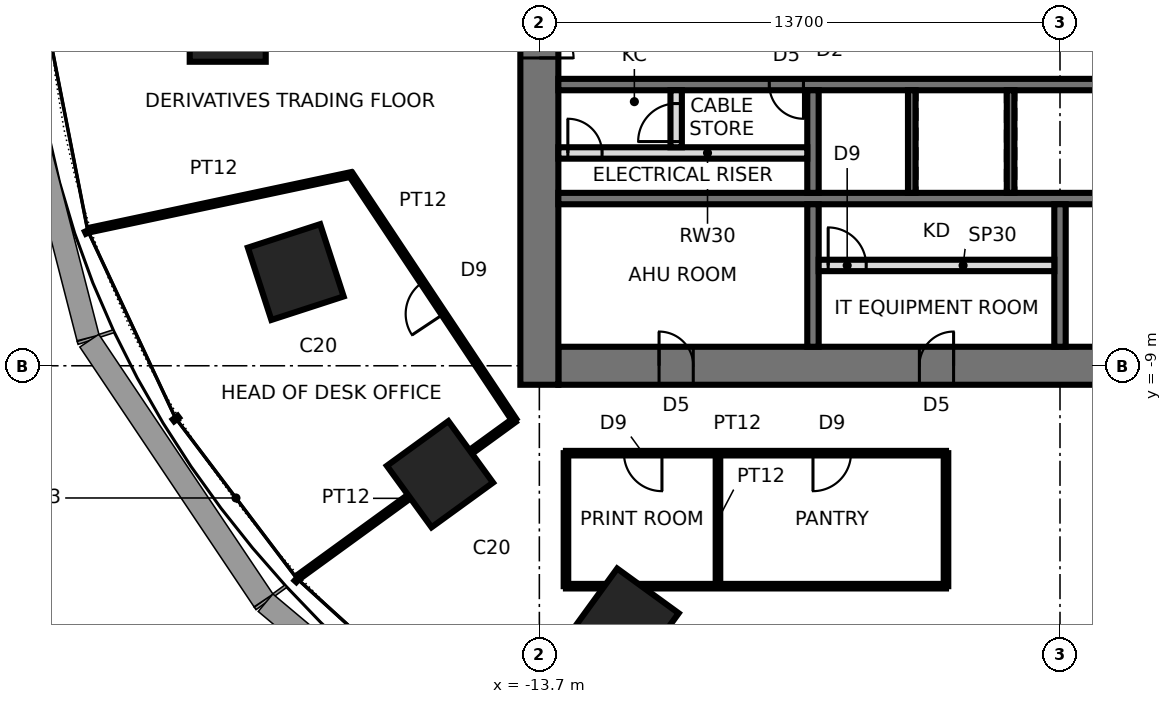
"""IFC4 building model, lengths in metres.
Left out: names, types, materials, properties, quantities, classifications, styles, units other than length and angle.
Written with IfcOpenShell. Run it as: python <this file> out.ifc"""

import sys

from ifc_helpers import new_model, si_unit, direction, frame, frame_2d, origin, origin_2d, place, context, subcontext, project, spatial, rectangle, extrude, element, fill, save


model = new_model("IFC4")
c1 = context("Model", 3, precision=1e-05, world=origin(), true_north=direction((0.0, 1.0)))
c2 = subcontext(c1, "Body", "Model", "MODEL_VIEW")
j1 = project(units=[si_unit("LENGTHUNIT", "METRE"), si_unit("PLANEANGLEUNIT", "RADIAN")], contexts=[c1])
p1 = place(None, origin())
s1 = spatial("IfcSite", under=j1, at=p1, CompositionType="ELEMENT")
p2 = place(p1, origin())
s2 = spatial("IfcBuilding", under=s1, at=p2, CompositionType="ELEMENT")
p3 = place(p2, frame((0.0, 0.0, 23.8)))
s3 = spatial("IfcBuildingStorey", under=s2, at=p3, CompositionType="ELEMENT", Elevation=23.8)
for number, where, z_axis, x_axis in (
    (1, (-21.9, 0.0, 0.0), (0.0, 0.0, 1.0), (-1.0, 0.0, 0.0)),
    (2, (-20.109, -6.534, 0.0), (0.0, 0.0, 1.0), (-0.951, -0.309, 0.0)),
    (3, (-16.315, -11.854, 0.0), (0.0, 0.0, 1.0), (-0.809, -0.588, 0.0)),
    (4, (-11.43, -15.733, 0.0), (0.0, 0.0, 1.0), (-0.588, -0.809, 0.0)),
):
    element("IfcColumn", number, at=place(p3, frame(where, z_axis=z_axis, x_axis=x_axis)), inside=s3, PredefinedType="COLUMN", context=c2, shape_type="SweptSolid", body=[
        extrude(rectangle(XDim=2.0, YDim=2.0, at=origin_2d()), origin(), (0.0, 0.0, 1.0), 4.2),
    ])
p4 = place(p3, frame((-13.2, -9.0, 0.0), z_axis=(0.0, 0.0, 1.0), x_axis=(1.0, 0.0, 0.0)))
e5 = element("IfcWall", 5, at=p4, inside=s3, PredefinedType="SHEAR", context=c2, shape_type="SweptSolid", body=[
    extrude(rectangle(XDim=26.4, YDim=1.0, at=frame_2d((13.2, 0.0))), origin(), (0.0, 0.0, 1.0), 4.2),
])
p5 = place(p4, frame((2.65, 0.0, 0.0)))
e6 = element("IfcOpeningElement", 6, at=p5, cuts=e5, PredefinedType="OPENING", context=c2, shape_type="SweptSolid", body=[
    extrude(rectangle(XDim=0.9, YDim=2.1, at=frame_2d((0.45, 1.05))), frame((0.0, 0.51, 0.0), z_axis=(0.0, -1.0, 0.0), x_axis=(1.0, 0.0, 0.0)), (0.0, 0.0, 1.0), 1.02),
])
p6 = place(p4, frame((9.5, 0.0, 0.0)))
e7 = element("IfcOpeningElement", 7, at=p6, cuts=e5, PredefinedType="OPENING", context=c2, shape_type="SweptSolid", body=[
    extrude(rectangle(XDim=0.9, YDim=2.1, at=frame_2d((0.45, 1.05))), frame((0.0, 0.51, 0.0), z_axis=(0.0, -1.0, 0.0), x_axis=(1.0, 0.0, 0.0)), (0.0, 0.0, 1.0), 1.02),
])
p7 = place(p4, frame((16.0, 0.0, 0.0)))
e8 = element("IfcOpeningElement", 8, at=p7, cuts=e5, PredefinedType="OPENING", context=c2, shape_type="SweptSolid", body=[
    extrude(rectangle(XDim=0.9, YDim=2.1, at=frame_2d((0.45, 1.05))), frame((0.0, 0.51, 0.0), z_axis=(0.0, -1.0, 0.0), x_axis=(1.0, 0.0, 0.0)), (0.0, 0.0, 1.0), 1.02),
])
p8 = place(p4, frame((22.85, 0.0, 0.0)))
e9 = element("IfcOpeningElement", 9, at=p8, cuts=e5, PredefinedType="OPENING", context=c2, shape_type="SweptSolid", body=[
    extrude(rectangle(XDim=0.9, YDim=2.1, at=frame_2d((0.45, 1.05))), frame((0.0, 0.51, 0.0), z_axis=(0.0, -1.0, 0.0), x_axis=(1.0, 0.0, 0.0)), (0.0, 0.0, 1.0), 1.02),
])
p9 = place(p3, frame((-13.7, 9.5, 0.0), z_axis=(0.0, 0.0, 1.0), x_axis=(0.0, -1.0, 0.0)))
e10 = element("IfcWall", 10, at=p9, inside=s3, PredefinedType="SHEAR", context=c2, shape_type="SweptSolid", body=[
    extrude(rectangle(XDim=19.0, YDim=1.0, at=frame_2d((9.5, 0.0))), origin(), (0.0, 0.0, 1.0), 4.2),
])
p10 = place(p9, frame((8.6, 0.0, 0.0)))
e11 = element("IfcOpeningElement", 11, at=p10, cuts=e10, PredefinedType="OPENING", context=c2, shape_type="SweptSolid", body=[
    extrude(rectangle(XDim=1.8, YDim=2.4, at=frame_2d((0.9, 1.2))), frame((0.0, 0.51, 0.0), z_axis=(0.0, -1.0, 0.0), x_axis=(1.0, 0.0, 0.0)), (0.0, 0.0, 1.0), 1.02),
])
p11 = place(p3, frame((-13.2, -1.6, 0.0), z_axis=(0.0, 0.0, 1.0), x_axis=(1.0, 0.0, 0.0)))
e12 = element("IfcWall", 12, at=p11, inside=s3, PredefinedType="SHEAR", context=c2, shape_type="SweptSolid", body=[
    extrude(rectangle(XDim=26.4, YDim=0.3, at=frame_2d((13.2, 0.0))), origin(), (0.0, 0.0, 1.0), 4.2),
])
p12 = place(p11, frame((25.15, 0.0, 0.0)))
e13 = element("IfcOpeningElement", 13, at=p12, cuts=e12, PredefinedType="OPENING", context=c2, shape_type="SweptSolid", body=[
    extrude(rectangle(XDim=1.0, YDim=2.1, at=frame_2d((0.5, 1.05))), frame((0.0, 0.16, 0.0), z_axis=(0.0, -1.0, 0.0), x_axis=(1.0, 0.0, 0.0)), (0.0, 0.0, 1.0), 0.32),
])
p13 = place(p11, frame((15.25, 0.0, 0.0)))
e14 = element("IfcOpeningElement", 14, at=p13, cuts=e12, PredefinedType="OPENING", context=c2, shape_type="SweptSolid", body=[
    extrude(rectangle(XDim=1.1, YDim=2.3, at=frame_2d((0.55, 1.15))), frame((0.0, 0.16, 0.0), z_axis=(0.0, -1.0, 0.0), x_axis=(1.0, 0.0, 0.0)), (0.0, 0.0, 1.0), 0.32),
])
p14 = place(p11, frame((17.85, 0.0, 0.0)))
e15 = element("IfcOpeningElement", 15, at=p14, cuts=e12, PredefinedType="OPENING", context=c2, shape_type="SweptSolid", body=[
    extrude(rectangle(XDim=1.1, YDim=2.3, at=frame_2d((0.55, 1.15))), frame((0.0, 0.16, 0.0), z_axis=(0.0, -1.0, 0.0), x_axis=(1.0, 0.0, 0.0)), (0.0, 0.0, 1.0), 0.32),
])
p15 = place(p11, frame((5.55, 0.0, 0.0)))
e16 = element("IfcOpeningElement", 16, at=p15, cuts=e12, PredefinedType="OPENING", context=c2, shape_type="SweptSolid", body=[
    extrude(rectangle(XDim=0.9, YDim=2.1, at=frame_2d((0.45, 1.05))), frame((0.0, 0.16, 0.0), z_axis=(0.0, -1.0, 0.0), x_axis=(1.0, 0.0, 0.0)), (0.0, 0.0, 1.0), 0.32),
])
p16 = place(p3, frame((-13.2, -4.6, 0.0), z_axis=(0.0, 0.0, 1.0), x_axis=(1.0, 0.0, 0.0)))
e17 = element("IfcWall", 17, at=p16, inside=s3, PredefinedType="SHEAR", context=c2, shape_type="SweptSolid", body=[
    extrude(rectangle(XDim=26.4, YDim=0.3, at=frame_2d((13.2, 0.0))), origin(), (0.0, 0.0, 1.0), 4.2),
])
p17 = place(p3, frame((-6.5, -1.75, 0.0), z_axis=(0.0, 0.0, 1.0), x_axis=(0.0, -1.0, 0.0)))
e18 = element("IfcWall", 18, at=p17, inside=s3, PredefinedType="SHEAR", context=c2, shape_type="SweptSolid", body=[
    extrude(rectangle(XDim=2.7, YDim=0.3, at=frame_2d((1.35, 0.0))), origin(), (0.0, 0.0, 1.0), 4.2),
])
p18 = place(p3, frame((-6.5, -4.75, 0.0), z_axis=(0.0, 0.0, 1.0), x_axis=(0.0, -1.0, 0.0)))
e19 = element("IfcWall", 19, at=p18, inside=s3, PredefinedType="SHEAR", context=c2, shape_type="SweptSolid", body=[
    extrude(rectangle(XDim=3.75, YDim=0.3, at=frame_2d((1.875, 0.0))), origin(), (0.0, 0.0, 1.0), 4.2),
])
for number, where, z_axis, x_axis in (
    (20, (-3.9, -1.75, 0.0), (0.0, 0.0, 1.0), (0.0, -1.0, 0.0)),
    (21, (-1.3, -1.75, 0.0), (0.0, 0.0, 1.0), (0.0, -1.0, 0.0)),
):
    element("IfcWall", number, at=place(p3, frame(where, z_axis=z_axis, x_axis=x_axis)), inside=s3, PredefinedType="SHEAR", context=c2, shape_type="SweptSolid", body=[
        extrude(rectangle(XDim=2.7, YDim=0.2, at=frame_2d((1.35, 0.0))), origin(), (0.0, 0.0, 1.0), 4.2),
    ])
p19 = place(p3, frame((0.0, -4.75, 0.0), z_axis=(0.0, 0.0, 1.0), x_axis=(0.0, -1.0, 0.0)))
e22 = element("IfcWall", 22, at=p19, inside=s3, PredefinedType="SHEAR", context=c2, shape_type="SweptSolid", body=[
    extrude(rectangle(XDim=3.75, YDim=0.3, at=frame_2d((1.875, 0.0))), origin(), (0.0, 0.0, 1.0), 4.2),
])
p20 = place(p3, frame((-6.35, -6.36, 0.0), z_axis=(0.0, 0.0, 1.0), x_axis=(1.0, 0.0, 0.0)))
e23 = element("IfcWall", 23, at=p20, inside=s3, PredefinedType="PARTITIONING", context=c2, shape_type="SweptSolid", body=[
    extrude(rectangle(XDim=6.2, YDim=0.3, at=frame_2d((3.1, 0.0))), origin(), (0.0, 0.0, 1.0), 4.04),
])
p21 = place(p20, frame((0.25, 0.0, 0.0)))
e24 = element("IfcOpeningElement", 24, at=p21, cuts=e23, PredefinedType="OPENING", context=c2, shape_type="SweptSolid", body=[
    extrude(rectangle(XDim=1.0, YDim=2.4, at=frame_2d((0.5, 1.2))), frame((0.0, 0.16, 0.0), z_axis=(0.0, -1.0, 0.0), x_axis=(1.0, 0.0, 0.0)), (0.0, 0.0, 1.0), 0.32),
])
p22 = place(p3, frame((-13.2, -3.4, 0.0), z_axis=(0.0, 0.0, 1.0), x_axis=(1.0, 0.0, 0.0)))
e25 = element("IfcWall", 25, at=p22, inside=s3, PredefinedType="SOLIDWALL", context=c2, shape_type="SweptSolid", body=[
    extrude(rectangle(XDim=6.55, YDim=0.3, at=frame_2d((3.275, 0.0))), origin(), (0.0, 0.0, 1.0), 4.04),
])
p23 = place(p22, frame((0.25, 0.0, 0.0)))
e26 = element("IfcOpeningElement", 26, at=p23, cuts=e25, PredefinedType="OPENING", context=c2, shape_type="SweptSolid", body=[
    extrude(rectangle(XDim=0.9, YDim=2.1, at=frame_2d((0.45, 1.05))), frame((0.0, 0.16, 0.0), z_axis=(0.0, -1.0, 0.0), x_axis=(1.0, 0.0, 0.0)), (0.0, 0.0, 1.0), 0.32),
])
p24 = place(p3, frame((-10.1, -3.25, 0.0), z_axis=(0.0, 0.0, 1.0), x_axis=(0.0, 1.0, 0.0)))
e27 = element("IfcWall", 27, at=p24, inside=s3, PredefinedType="PARTITIONING", context=c2, shape_type="SweptSolid", body=[
    extrude(rectangle(XDim=1.5, YDim=0.3, at=frame_2d((0.75, 0.0))), origin(), (0.0, 0.0, 1.0), 4.04),
])
p25 = place(p24, frame((0.15, 0.0, 0.0)))
e28 = element("IfcOpeningElement", 28, at=p25, cuts=e27, PredefinedType="OPENING", context=c2, shape_type="SweptSolid", body=[
    extrude(rectangle(XDim=1.0, YDim=2.4, at=frame_2d((0.5, 1.2))), frame((0.0, 0.16, 0.0), z_axis=(0.0, -1.0, 0.0), x_axis=(1.0, 0.0, 0.0)), (0.0, 0.0, 1.0), 0.32),
])
p26 = place(p3, frame((-18.659, -3.966, 0.0), z_axis=(0.0, 0.0, 1.0), x_axis=(-0.978148655968, -0.207906726269, 0.0)))
e29 = element("IfcWall", 29, at=p26, inside=s3, PredefinedType="PARTITIONING", context=c2, shape_type="SweptSolid", body=[
    extrude(rectangle(XDim=7.0, YDim=0.12, at=frame_2d((3.5, 0.0))), origin(), (0.0, 0.0, 1.0), 4.04),
])
p27 = place(p3, frame((-14.358, -10.431, 0.0), z_axis=(0.0, 0.0, 1.0), x_axis=(-0.553959944771, 0.832543319948, 0.0)))
e30 = element("IfcWall", 30, at=p27, inside=s3, PredefinedType="PARTITIONING", context=c2, shape_type="SweptSolid", body=[
    extrude(rectangle(XDim=7.765, YDim=0.12, at=frame_2d((3.883, 0.0))), origin(), (0.0, 0.0, 1.0), 4.04),
])
p28 = place(p27, frame((3.358, 0.0, 0.0)))
e31 = element("IfcOpeningElement", 31, at=p28, cuts=e30, PredefinedType="OPENING", context=c2, shape_type="SweptSolid", body=[
    extrude(rectangle(XDim=1.0, YDim=2.4, at=frame_2d((0.5, 1.2))), frame((0.0, 0.07, 0.0), z_axis=(0.0, -1.0, 0.0), x_axis=(1.0, 0.0, 0.0)), (0.0, 0.0, 1.0), 0.14),
])
p29 = place(p3, frame((-20.021, -14.546, 0.0), z_axis=(0.0, 0.0, 1.0), x_axis=(0.809015012105, 0.587787980643, 0.0)))
e32 = element("IfcWall", 32, at=p29, inside=s3, PredefinedType="PARTITIONING", context=c2, shape_type="SweptSolid", body=[
    extrude(rectangle(XDim=7.0, YDim=0.12, at=frame_2d((3.5, 0.0))), origin(), (0.0, 0.0, 1.0), 2.84),
])
p30 = place(p3, frame((-13.0, -14.8, 0.0), z_axis=(0.0, 0.0, 1.0), x_axis=(0.0, 1.0, 0.0)))
e33 = element("IfcWall", 33, at=p30, inside=s3, PredefinedType="PARTITIONING", context=c2, shape_type="SweptSolid", body=[
    extrude(rectangle(XDim=3.5, YDim=0.12, at=frame_2d((1.75, 0.0))), origin(), (0.0, 0.0, 1.0), 4.04),
])
p31 = place(p3, frame((-13.0, -11.3, 0.0), z_axis=(0.0, 0.0, 1.0), x_axis=(1.0, 0.0, 0.0)))
e34 = element("IfcWall", 34, at=p31, inside=s3, PredefinedType="PARTITIONING", context=c2, shape_type="SweptSolid", body=[
    extrude(rectangle(XDim=10.0, YDim=0.12, at=frame_2d((5.0, 0.0))), origin(), (0.0, 0.0, 1.0), 4.04),
])
p32 = place(p31, frame((1.526, 0.0, 0.0)))
e35 = element("IfcOpeningElement", 35, at=p32, cuts=e34, PredefinedType="OPENING", context=c2, shape_type="SweptSolid", body=[
    extrude(rectangle(XDim=1.0, YDim=2.4, at=frame_2d((0.5, 1.2))), frame((0.0, 0.07, 0.0), z_axis=(0.0, -1.0, 0.0), x_axis=(1.0, 0.0, 0.0)), (0.0, 0.0, 1.0), 0.14),
])
p33 = place(p31, frame((6.5, 0.0, 0.0)))
e36 = element("IfcOpeningElement", 36, at=p33, cuts=e34, PredefinedType="OPENING", context=c2, shape_type="SweptSolid", body=[
    extrude(rectangle(XDim=1.0, YDim=2.4, at=frame_2d((0.5, 1.2))), frame((0.0, 0.07, 0.0), z_axis=(0.0, -1.0, 0.0), x_axis=(1.0, 0.0, 0.0)), (0.0, 0.0, 1.0), 0.14),
])
p34 = place(p3, frame((-9.0, -11.3, 0.0), z_axis=(0.0, 0.0, 1.0), x_axis=(0.0, -1.0, 0.0)))
e37 = element("IfcWall", 37, at=p34, inside=s3, PredefinedType="PARTITIONING", context=c2, shape_type="SweptSolid", body=[
    extrude(rectangle(XDim=3.5, YDim=0.12, at=frame_2d((1.75, 0.0))), origin(), (0.0, 0.0, 1.0), 4.04),
])
p35 = place(p3, frame((-3.0, -14.8, 0.0), z_axis=(0.0, 0.0, 1.0), x_axis=(-1.0, 0.0, 0.0)))
e38 = element("IfcWall", 38, at=p35, inside=s3, PredefinedType="PARTITIONING", context=c2, shape_type="SweptSolid", body=[
    extrude(rectangle(XDim=10.0, YDim=0.12, at=frame_2d((5.0, 0.0))), origin(), (0.0, 0.0, 1.0), 4.04),
])
p36 = place(p3, frame((-3.0, -11.3, 0.0), z_axis=(0.0, 0.0, 1.0), x_axis=(0.0, -1.0, 0.0)))
e39 = element("IfcWall", 39, at=p36, inside=s3, PredefinedType="PARTITIONING", context=c2, shape_type="SweptSolid", body=[
    extrude(rectangle(XDim=3.5, YDim=0.12, at=frame_2d((1.75, 0.0))), origin(), (0.0, 0.0, 1.0), 4.04),
])
p37 = place(p10, origin())
e40 = element("IfcDoor", 40, at=p37, inside=s3, OperationType="DOUBLE_DOOR_SINGLE_SWING", PredefinedType="DOOR", context=c2, shape_type="SweptSolid", body=[
    extrude(rectangle(XDim=1.72, YDim=2.36, at=frame_2d((0.9, 1.18))), frame((0.0, 0.025, 0.0), z_axis=(0.0, -1.0, 0.0), x_axis=(1.0, 0.0, 0.0)), (0.0, 0.0, 1.0), 0.05),
    extrude(rectangle(XDim=0.04, YDim=2.4, at=frame_2d((0.02, 1.2))), frame((0.0, 0.25, 0.0), z_axis=(0.0, -1.0, 0.0), x_axis=(1.0, 0.0, 0.0)), (0.0, 0.0, 1.0), 0.5),
    extrude(rectangle(XDim=0.04, YDim=2.4, at=frame_2d((1.78, 1.2))), frame((0.0, 0.25, 0.0), z_axis=(0.0, -1.0, 0.0), x_axis=(1.0, 0.0, 0.0)), (0.0, 0.0, 1.0), 0.5),
    extrude(rectangle(XDim=1.72, YDim=0.04, at=frame_2d((0.9, 2.38))), frame((0.0, 0.25, 0.0), z_axis=(0.0, -1.0, 0.0), x_axis=(1.0, 0.0, 0.0)), (0.0, 0.0, 1.0), 0.5),
])
fill(e11, e40)
p38 = place(p15, frame((0.9, 0.0, 0.0), z_axis=(0.0, 0.0, 1.0), x_axis=(-1.0, 0.0, 0.0)))
e41 = element("IfcDoor", 41, at=p38, inside=s3, OperationType="SINGLE_SWING_LEFT", PredefinedType="DOOR", context=c2, shape_type="SweptSolid", body=[
    extrude(rectangle(XDim=0.9, YDim=2.1, at=frame_2d((0.45, 1.05))), frame((0.0, 0.025, 0.0), z_axis=(0.0, -1.0, 0.0), x_axis=(1.0, 0.0, 0.0)), (0.0, 0.0, 1.0), 0.05),
])
fill(e16, e41)
p39 = place(p5, origin())
e42 = element("IfcDoor", 42, at=p39, inside=s3, OperationType="SINGLE_SWING_LEFT", PredefinedType="DOOR", context=c2, shape_type="SweptSolid", body=[
    extrude(rectangle(XDim=0.82, YDim=2.06, at=frame_2d((0.45, 1.03))), frame((0.0, 0.025, 0.0), z_axis=(0.0, -1.0, 0.0), x_axis=(1.0, 0.0, 0.0)), (0.0, 0.0, 1.0), 0.05),
    extrude(rectangle(XDim=0.04, YDim=2.1, at=frame_2d((0.02, 1.05))), frame((0.0, 0.25, 0.0), z_axis=(0.0, -1.0, 0.0), x_axis=(1.0, 0.0, 0.0)), (0.0, 0.0, 1.0), 0.5),
    extrude(rectangle(XDim=0.04, YDim=2.1, at=frame_2d((0.88, 1.05))), frame((0.0, 0.25, 0.0), z_axis=(0.0, -1.0, 0.0), x_axis=(1.0, 0.0, 0.0)), (0.0, 0.0, 1.0), 0.5),
    extrude(rectangle(XDim=0.82, YDim=0.04, at=frame_2d((0.45, 2.08))), frame((0.0, 0.25, 0.0), z_axis=(0.0, -1.0, 0.0), x_axis=(1.0, 0.0, 0.0)), (0.0, 0.0, 1.0), 0.5),
])
fill(e6, e42)
p40 = place(p6, origin())
e43 = element("IfcDoor", 43, at=p40, inside=s3, OperationType="SINGLE_SWING_RIGHT", PredefinedType="DOOR", context=c2, shape_type="SweptSolid", body=[
    extrude(rectangle(XDim=0.82, YDim=2.06, at=frame_2d((0.45, 1.03))), frame((0.0, 0.025, 0.0), z_axis=(0.0, -1.0, 0.0), x_axis=(1.0, 0.0, 0.0)), (0.0, 0.0, 1.0), 0.05),
    extrude(rectangle(XDim=0.04, YDim=2.1, at=frame_2d((0.02, 1.05))), frame((0.0, 0.25, 0.0), z_axis=(0.0, -1.0, 0.0), x_axis=(1.0, 0.0, 0.0)), (0.0, 0.0, 1.0), 0.5),
    extrude(rectangle(XDim=0.04, YDim=2.1, at=frame_2d((0.88, 1.05))), frame((0.0, 0.25, 0.0), z_axis=(0.0, -1.0, 0.0), x_axis=(1.0, 0.0, 0.0)), (0.0, 0.0, 1.0), 0.5),
    extrude(rectangle(XDim=0.82, YDim=0.04, at=frame_2d((0.45, 2.08))), frame((0.0, 0.25, 0.0), z_axis=(0.0, -1.0, 0.0), x_axis=(1.0, 0.0, 0.0)), (0.0, 0.0, 1.0), 0.5),
])
fill(e7, e43)
p41 = place(p21, origin())
e44 = element("IfcDoor", 44, at=p41, inside=s3, OperationType="SINGLE_SWING_LEFT", PredefinedType="DOOR", context=c2, shape_type="SweptSolid", body=[
    extrude(rectangle(XDim=1.0, YDim=2.4, at=frame_2d((0.5, 1.2))), frame((0.0, 0.025, 0.0), z_axis=(0.0, -1.0, 0.0), x_axis=(1.0, 0.0, 0.0)), (0.0, 0.0, 1.0), 0.05),
])
fill(e24, e44)
p42 = place(p23, origin())
e45 = element("IfcDoor", 45, at=p42, inside=s3, OperationType="SINGLE_SWING_LEFT", PredefinedType="DOOR", context=c2, shape_type="SweptSolid", body=[
    extrude(rectangle(XDim=0.9, YDim=2.1, at=frame_2d((0.45, 1.05))), frame((0.0, 0.025, 0.0), z_axis=(0.0, -1.0, 0.0), x_axis=(1.0, 0.0, 0.0)), (0.0, 0.0, 1.0), 0.05),
])
fill(e26, e45)
p43 = place(p25, origin())
e46 = element("IfcDoor", 46, at=p43, inside=s3, OperationType="SINGLE_SWING_LEFT", PredefinedType="DOOR", context=c2, shape_type="SweptSolid", body=[
    extrude(rectangle(XDim=1.0, YDim=2.4, at=frame_2d((0.5, 1.2))), frame((0.0, 0.025, 0.0), z_axis=(0.0, -1.0, 0.0), x_axis=(1.0, 0.0, 0.0)), (0.0, 0.0, 1.0), 0.05),
])
fill(e28, e46)
p44 = place(p28, origin())
e47 = element("IfcDoor", 47, at=p44, inside=s3, OperationType="SINGLE_SWING_LEFT", PredefinedType="DOOR", context=c2, shape_type="SweptSolid", body=[
    extrude(rectangle(XDim=1.0, YDim=2.4, at=frame_2d((0.5, 1.2))), frame((0.0, 0.025, 0.0), z_axis=(0.0, -1.0, 0.0), x_axis=(1.0, 0.0, 0.0)), (0.0, 0.0, 1.0), 0.05),
])
fill(e31, e47)
p45 = place(p32, frame((1.0, 0.0, 0.0), z_axis=(0.0, 0.0, 1.0), x_axis=(-1.0, 0.0, 0.0)))
e48 = element("IfcDoor", 48, at=p45, inside=s3, OperationType="SINGLE_SWING_LEFT", PredefinedType="DOOR", context=c2, shape_type="SweptSolid", body=[
    extrude(rectangle(XDim=1.0, YDim=2.4, at=frame_2d((0.5, 1.2))), frame((0.0, 0.025, 0.0), z_axis=(0.0, -1.0, 0.0), x_axis=(1.0, 0.0, 0.0)), (0.0, 0.0, 1.0), 0.05),
])
fill(e35, e48)
p46 = place(p33, frame((1.0, 0.0, 0.0), z_axis=(0.0, 0.0, 1.0), x_axis=(-1.0, 0.0, 0.0)))
e49 = element("IfcDoor", 49, at=p46, inside=s3, OperationType="SINGLE_SWING_RIGHT", PredefinedType="DOOR", context=c2, shape_type="SweptSolid", body=[
    extrude(rectangle(XDim=1.0, YDim=2.4, at=frame_2d((0.5, 1.2))), frame((0.0, 0.025, 0.0), z_axis=(0.0, -1.0, 0.0), x_axis=(1.0, 0.0, 0.0)), (0.0, 0.0, 1.0), 0.05),
])
fill(e36, e49)
save(model, sys.argv[1])
